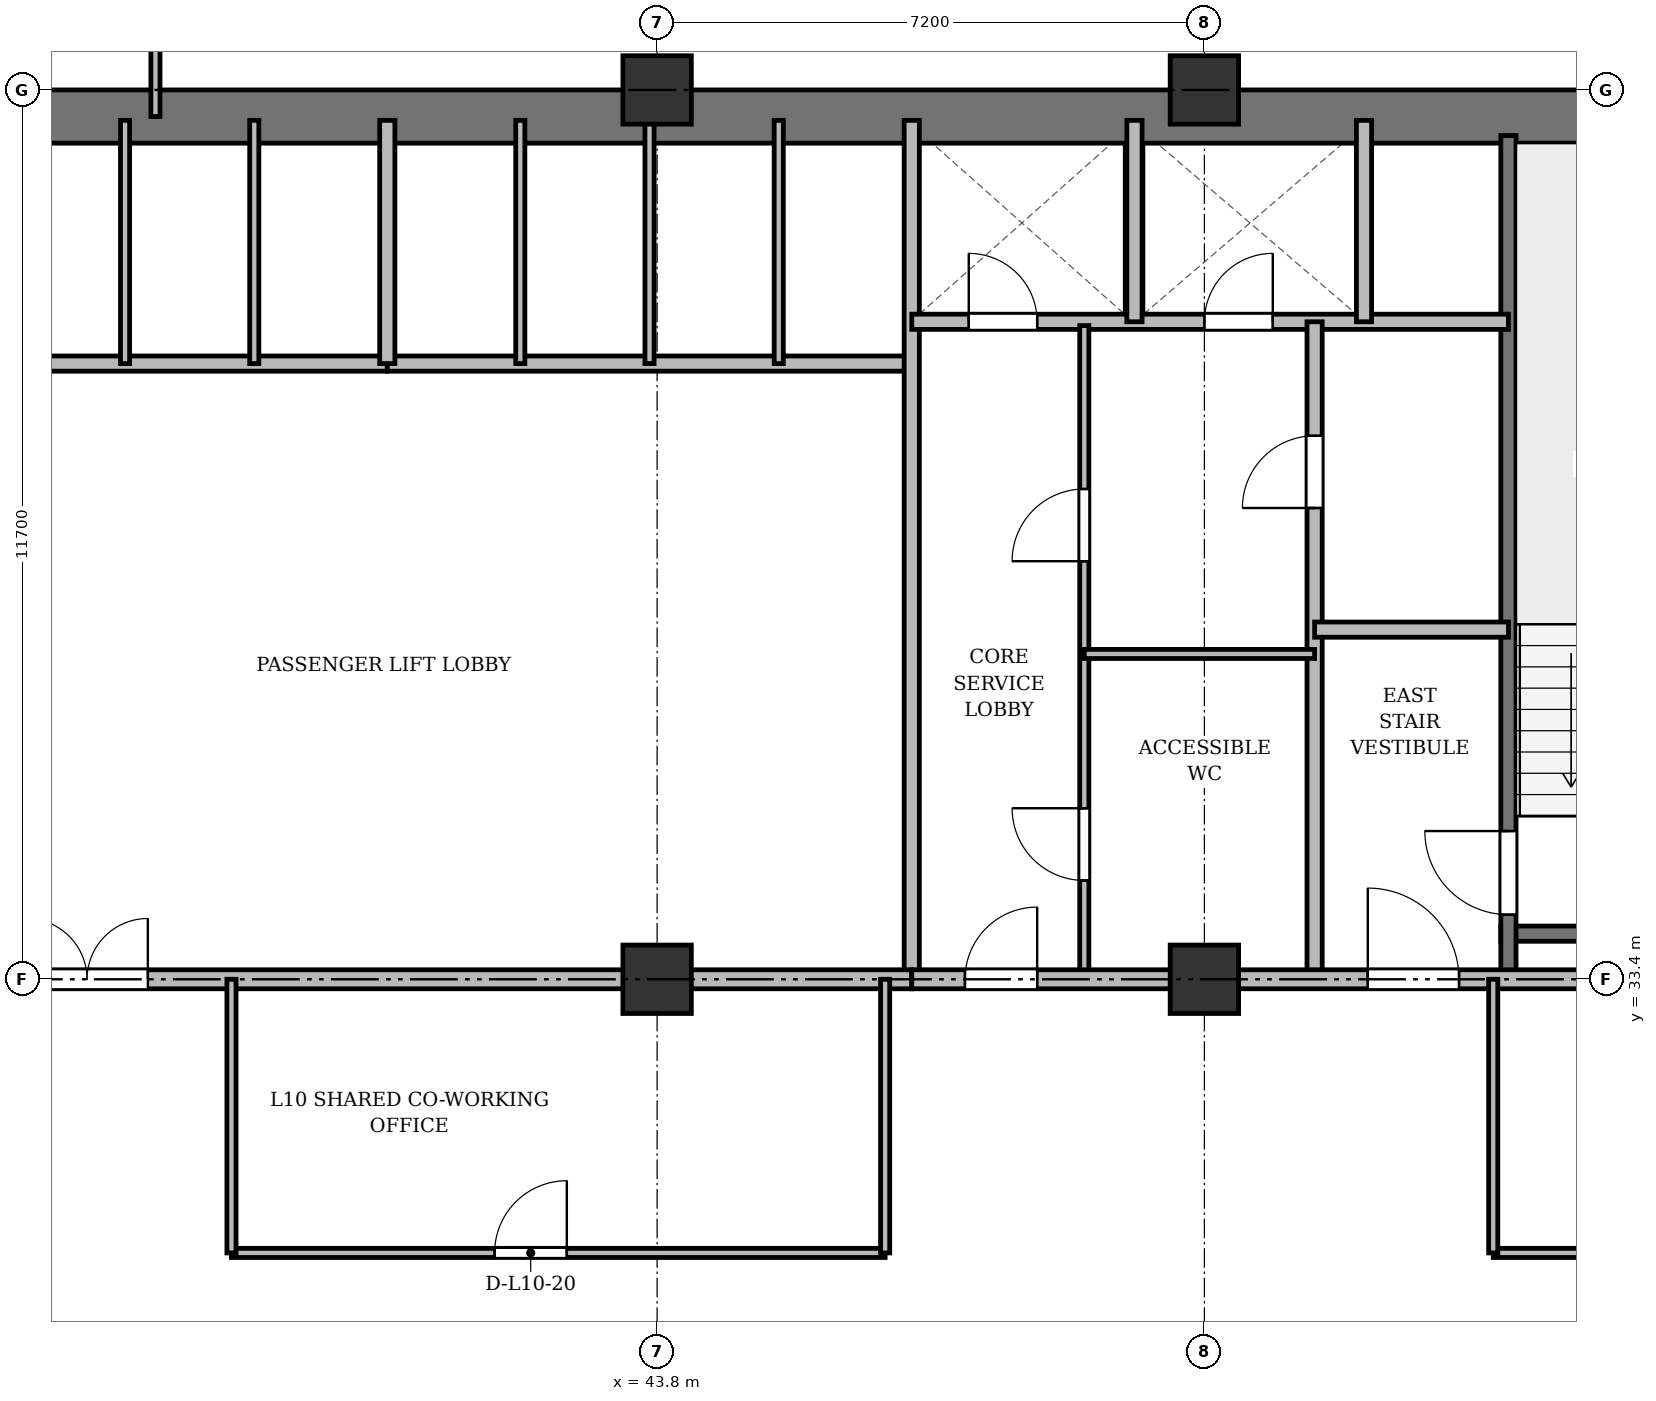
"""IFC4 building model, lengths in metres.
Left out: names, types, materials, properties, quantities, classifications, styles, units other than length and angle.
Written with IfcOpenShell. Run it as: python <this file> out.ifc"""

import sys

from ifc_helpers import new_model, si_unit, direction, frame, frame_2d, origin, origin_2d, place, context, subcontext, project, spatial, rectangle, extrude, source, transform, mapped, element, fill, save


model = new_model("IFC4")
c1 = context("Model", 3, precision=1e-05, world=origin(), true_north=direction((0.0, 1.0)))
c2 = subcontext(c1, "Body", "Model", "MODEL_VIEW")
j1 = project(units=[si_unit("LENGTHUNIT", "METRE"), si_unit("PLANEANGLEUNIT", "RADIAN")], contexts=[c1])
p1 = place(None, origin())
s1 = spatial("IfcSite", under=j1, at=p1, CompositionType="ELEMENT")
p2 = place(p1, origin())
s2 = spatial("IfcBuilding", under=s1, at=p2, CompositionType="ELEMENT")
p3 = place(p2, frame((0.0, 0.0, 41.5)))
s3 = spatial("IfcBuildingStorey", under=s2, at=p3, CompositionType="ELEMENT", Elevation=41.5)
m1 = source(origin(), c2, "Body", "SweptSolid", [
    extrude(rectangle(XDim=0.9, YDim=0.9, at=origin_2d()), origin(), (0.0, 0.0, 1.0), 3.6),
])
for number, where, z_axis, x_axis in (
    (1, (43.8, 33.4, 0.0), (0.0, 0.0, 1.0), (1.0, 0.0, 0.0)),
    (2, (43.8, 45.1, 0.0), (0.0, 0.0, 1.0), (1.0, 0.0, 0.0)),
    (3, (51.0, 33.4, 0.0), (0.0, 0.0, 1.0), (1.0, 0.0, 0.0)),
    (4, (51.0, 45.1, 0.0), (0.0, 0.0, 1.0), (1.0, 0.0, 0.0)),
):
    element("IfcColumn", number, at=place(p3, frame(where, z_axis=z_axis, x_axis=x_axis)), inside=s3, PredefinedType="COLUMN", context=c2, shape_type="MappedRepresentation", body=[
        mapped(m1, transform((0.0, 0.0, 0.0), x_axis=(1.0, 0.0, 0.0), y_axis=(0.0, 1.0, 0.0), z_axis=(0.0, 0.0, 1.0), scale=1.0)),
    ])
p4 = place(p3, frame((15.5, 44.75, 0.0), z_axis=(0.0, 0.0, 1.0), x_axis=(1.0, 0.0, 0.0)))
e5 = element("IfcWall", 5, at=p4, inside=s3, PredefinedType="SHEAR", context=c2, shape_type="SweptSolid", body=[
    extrude(rectangle(XDim=43.4, YDim=0.7, at=frame_2d((21.7, 0.0))), origin(), (0.0, 0.0, 1.0), 3.34),
])
p5 = place(p3, frame((54.9, 34.0, 0.0), z_axis=(0.0, 0.0, 1.0), x_axis=(1.0, 0.0, 0.0)))
e6 = element("IfcWall", 6, at=p5, inside=s3, PredefinedType="SHEAR", context=c2, shape_type="SweptSolid", body=[
    extrude(rectangle(XDim=3.4, YDim=0.2, at=frame_2d((1.7, 0.0))), origin(), (0.0, 0.0, 1.0), 3.34),
])
p6 = place(p3, frame((55.0, 33.4, 0.0), z_axis=(0.0, 0.0, 1.0), x_axis=(0.0, 1.0, 0.0)))
e7 = element("IfcWall", 7, at=p6, inside=s3, PredefinedType="SHEAR", context=c2, shape_type="SweptSolid", body=[
    extrude(rectangle(XDim=11.1, YDim=0.2, at=frame_2d((5.55, 0.0))), origin(), (0.0, 0.0, 1.0), 3.34),
])
p7 = place(p6, frame((0.85, 0.0, 0.0)))
e8 = element("IfcOpeningElement", 8, at=p7, cuts=e7, PredefinedType="OPENING", context=c2, shape_type="SweptSolid", body=[
    extrude(rectangle(XDim=1.1, YDim=2.15, at=frame_2d((0.55, 1.075))), frame((0.0, 0.11, 0.0), z_axis=(0.0, -1.0, 0.0), x_axis=(1.0, 0.0, 0.0)), (0.0, 0.0, 1.0), 0.22),
])
p8 = place(p3, frame((33.35, 41.5, 0.0), z_axis=(0.0, 0.0, 1.0), x_axis=(1.0, 0.0, 0.0)))
e9 = element("IfcWall", 9, at=p8, inside=s3, PredefinedType="SOLIDWALL", context=c2, shape_type="SweptSolid", body=[
    extrude(rectangle(XDim=6.9, YDim=0.2, at=frame_2d((3.45, 0.0))), origin(), (0.0, 0.0, 1.0), 3.34),
])
for number, where, z_axis, x_axis in (
    (10, (36.8, 41.5, 0.0), (0.0, 0.0, 1.0), (0.0, 1.0, 0.0)),
    (11, (38.5, 41.5, 0.0), (0.0, 0.0, 1.0), (0.0, 1.0, 0.0)),
):
    element("IfcWall", number, at=place(p3, frame(where, z_axis=z_axis, x_axis=x_axis)), inside=s3, PredefinedType="PARTITIONING", context=c2, shape_type="SweptSolid", body=[
        extrude(rectangle(XDim=3.2, YDim=0.12, at=frame_2d((1.6, 0.0))), origin(), (0.0, 0.0, 1.0), 3.34),
    ])
p9 = place(p3, frame((40.25, 41.5, 0.0), z_axis=(0.0, 0.0, 1.0), x_axis=(1.0, 0.0, 0.0)))
e12 = element("IfcWall", 12, at=p9, inside=s3, PredefinedType="SOLIDWALL", context=c2, shape_type="SweptSolid", body=[
    extrude(rectangle(XDim=6.9, YDim=0.2, at=frame_2d((3.45, 0.0))), origin(), (0.0, 0.0, 1.0), 2.752),
])
p10 = place(p3, frame((40.25, 41.5, 0.0), z_axis=(0.0, 0.0, 1.0), x_axis=(0.0, 1.0, 0.0)))
e13 = element("IfcWall", 13, at=p10, inside=s3, PredefinedType="SOLIDWALL", context=c2, shape_type="SweptSolid", body=[
    extrude(rectangle(XDim=3.2, YDim=0.2, at=frame_2d((1.6, 0.0))), origin(), (0.0, 0.0, 1.0), 3.34),
])
p11 = place(p3, frame((42.0, 41.5, 0.0), z_axis=(0.0, 0.0, 1.0), x_axis=(0.0, 1.0, 0.0)))
e14 = element("IfcWall", 14, at=p11, inside=s3, PredefinedType="PARTITIONING", context=c2, shape_type="SweptSolid", body=[
    extrude(rectangle(XDim=3.2, YDim=0.12, at=frame_2d((1.6, 0.0))), origin(), (0.0, 0.0, 1.0), 3.34),
])
p12 = place(p3, frame((43.7, 41.5, 0.0), z_axis=(0.0, 0.0, 1.0), x_axis=(0.0, 1.0, 0.0)))
e15 = element("IfcWall", 15, at=p12, inside=s3, PredefinedType="PARTITIONING", context=c2, shape_type="SweptSolid", body=[
    extrude(rectangle(XDim=3.2, YDim=0.12, at=frame_2d((1.6, 0.0))), origin(), (0.0, 0.0, 1.0), 2.752),
])
p13 = place(p3, frame((45.4, 41.5, 0.0), z_axis=(0.0, 0.0, 1.0), x_axis=(0.0, 1.0, 0.0)))
e16 = element("IfcWall", 16, at=p13, inside=s3, PredefinedType="PARTITIONING", context=c2, shape_type="SweptSolid", body=[
    extrude(rectangle(XDim=3.2, YDim=0.12, at=frame_2d((1.6, 0.0))), origin(), (0.0, 0.0, 1.0), 3.34),
])
p14 = place(p3, frame((47.15, 33.4, 0.0), z_axis=(0.0, 0.0, 1.0), x_axis=(0.0, 1.0, 0.0)))
e17 = element("IfcWall", 17, at=p14, inside=s3, PredefinedType="SOLIDWALL", context=c2, shape_type="SweptSolid", body=[
    extrude(rectangle(XDim=11.3, YDim=0.2, at=frame_2d((5.65, 0.0))), origin(), (0.0, 0.0, 1.0), 2.69),
])
p15 = place(p3, frame((26.3, 33.4, 0.0), z_axis=(0.0, 0.0, 1.0), x_axis=(1.0, 0.0, 0.0)))
e18 = element("IfcWall", 18, at=p15, inside=s3, PredefinedType="PARTITIONING", context=c2, shape_type="SweptSolid", body=[
    extrude(rectangle(XDim=20.85, YDim=0.25, at=frame_2d((10.425, 0.0))), origin(), (0.0, 0.0, 1.0), 2.69),
])
p16 = place(p15, frame((9.2, 0.0, 0.0)))
e19 = element("IfcOpeningElement", 19, at=p16, cuts=e18, PredefinedType="OPENING", context=c2, shape_type="SweptSolid", body=[
    extrude(rectangle(XDim=1.6, YDim=2.2, at=frame_2d((0.8, 1.1))), frame((0.0, 0.135, 0.0), z_axis=(0.0, -1.0, 0.0), x_axis=(1.0, 0.0, 0.0)), (0.0, 0.0, 1.0), 0.27),
])
p17 = place(p3, frame((47.15, 42.05, 0.0), z_axis=(0.0, 0.0, 1.0), x_axis=(1.0, 0.0, 0.0)))
e20 = element("IfcWall", 20, at=p17, inside=s3, PredefinedType="SOLIDWALL", context=c2, shape_type="SweptSolid", body=[
    extrude(rectangle(XDim=7.85, YDim=0.2, at=frame_2d((3.925, 0.0))), origin(), (0.0, 0.0, 1.0), 2.752),
])
p18 = place(p17, frame((0.75, 0.0, 0.0)))
e21 = element("IfcOpeningElement", 21, at=p18, cuts=e20, PredefinedType="OPENING", context=c2, shape_type="SweptSolid", body=[
    extrude(rectangle(XDim=0.9, YDim=2.1, at=frame_2d((0.45, 1.05))), frame((0.0, 0.11, 0.0), z_axis=(0.0, -1.0, 0.0), x_axis=(1.0, 0.0, 0.0)), (0.0, 0.0, 1.0), 0.22),
])
p19 = place(p17, frame((3.85, 0.0, 0.0)))
e22 = element("IfcOpeningElement", 22, at=p19, cuts=e20, PredefinedType="OPENING", context=c2, shape_type="SweptSolid", body=[
    extrude(rectangle(XDim=0.9, YDim=2.1, at=frame_2d((0.45, 1.05))), frame((0.0, 0.11, 0.0), z_axis=(0.0, -1.0, 0.0), x_axis=(1.0, 0.0, 0.0)), (0.0, 0.0, 1.0), 0.22),
])
for number, where, z_axis, x_axis in (
    (23, (50.08, 42.05, 0.0), (0.0, 0.0, 1.0), (0.0, 1.0, 0.0)),
    (24, (53.1, 42.05, 0.0), (0.0, 0.0, 1.0), (0.0, 1.0, 0.0)),
):
    element("IfcWall", number, at=place(p3, frame(where, z_axis=z_axis, x_axis=x_axis)), inside=s3, PredefinedType="SOLIDWALL", context=c2, shape_type="SweptSolid", body=[
        extrude(rectangle(XDim=2.65, YDim=0.2, at=frame_2d((1.325, 0.0))), origin(), (0.0, 0.0, 1.0), 3.34),
    ])
p20 = place(p3, frame((52.45, 33.4, 0.0), z_axis=(0.0, 0.0, 1.0), x_axis=(0.0, 1.0, 0.0)))
e25 = element("IfcWall", 25, at=p20, inside=s3, PredefinedType="PARTITIONING", context=c2, shape_type="SweptSolid", body=[
    extrude(rectangle(XDim=8.65, YDim=0.2, at=frame_2d((4.325, 0.0))), origin(), (0.0, 0.0, 1.0), 2.69),
])
p21 = place(p20, frame((6.2, 0.0, 0.0)))
e26 = element("IfcOpeningElement", 26, at=p21, cuts=e25, PredefinedType="OPENING", context=c2, shape_type="SweptSolid", body=[
    extrude(rectangle(XDim=0.95, YDim=2.15, at=frame_2d((0.475, 1.075))), frame((0.0, 0.11, 0.0), z_axis=(0.0, -1.0, 0.0), x_axis=(1.0, 0.0, 0.0)), (0.0, 0.0, 1.0), 0.22),
])
p22 = place(p3, frame((52.45, 38.0, 0.0), z_axis=(0.0, 0.0, 1.0), x_axis=(1.0, 0.0, 0.0)))
e27 = element("IfcWall", 27, at=p22, inside=s3, PredefinedType="PARTITIONING", context=c2, shape_type="SweptSolid", body=[
    extrude(rectangle(XDim=2.55, YDim=0.2, at=frame_2d((1.275, 0.0))), origin(), (0.0, 0.0, 1.0), 3.34),
])
p23 = place(p3, frame((49.42, 33.4, 0.0), z_axis=(0.0, 0.0, 1.0), x_axis=(0.0, 1.0, 0.0)))
e28 = element("IfcWall", 28, at=p23, inside=s3, PredefinedType="PARTITIONING", context=c2, shape_type="SweptSolid", body=[
    extrude(rectangle(XDim=8.6, YDim=0.12, at=frame_2d((4.3, 0.0))), origin(), (0.0, 0.0, 1.0), 2.69),
])
p24 = place(p23, frame((1.3, 0.0, 0.0)))
e29 = element("IfcOpeningElement", 29, at=p24, cuts=e28, PredefinedType="OPENING", context=c2, shape_type="SweptSolid", body=[
    extrude(rectangle(XDim=0.95, YDim=2.15, at=frame_2d((0.475, 1.075))), frame((0.0, 0.07, 0.0), z_axis=(0.0, -1.0, 0.0), x_axis=(1.0, 0.0, 0.0)), (0.0, 0.0, 1.0), 0.14),
])
p25 = place(p23, frame((5.5, 0.0, 0.0)))
e30 = element("IfcOpeningElement", 30, at=p25, cuts=e28, PredefinedType="OPENING", context=c2, shape_type="SweptSolid", body=[
    extrude(rectangle(XDim=0.95, YDim=2.15, at=frame_2d((0.475, 1.075))), frame((0.0, 0.07, 0.0), z_axis=(0.0, -1.0, 0.0), x_axis=(1.0, 0.0, 0.0)), (0.0, 0.0, 1.0), 0.14),
])
p26 = place(p3, frame((49.42, 37.68, 0.0), z_axis=(0.0, 0.0, 1.0), x_axis=(1.0, 0.0, 0.0)))
e31 = element("IfcWall", 31, at=p26, inside=s3, PredefinedType="PARTITIONING", context=c2, shape_type="SweptSolid", body=[
    extrude(rectangle(XDim=3.03, YDim=0.12, at=frame_2d((1.515, 0.0))), origin(), (0.0, 0.0, 1.0), 2.752),
])
p27 = place(p3, frame((47.15, 33.4, 0.0), z_axis=(0.0, 0.0, 1.0), x_axis=(1.0, 0.0, 0.0)))
e32 = element("IfcWall", 32, at=p27, inside=s3, PredefinedType="PARTITIONING", context=c2, shape_type="SweptSolid", body=[
    extrude(rectangle(XDim=11.15, YDim=0.25, at=frame_2d((5.575, 0.0))), origin(), (0.0, 0.0, 1.0), 2.69),
])
p28 = place(p27, frame((0.7, 0.0, 0.0)))
e33 = element("IfcOpeningElement", 33, at=p28, cuts=e32, PredefinedType="OPENING", context=c2, shape_type="SweptSolid", body=[
    extrude(rectangle(XDim=0.95, YDim=2.15, at=frame_2d((0.475, 1.075))), frame((0.0, 0.135, 0.0), z_axis=(0.0, -1.0, 0.0), x_axis=(1.0, 0.0, 0.0)), (0.0, 0.0, 1.0), 0.27),
])
p29 = place(p27, frame((6.0, 0.0, 0.0)))
e34 = element("IfcOpeningElement", 34, at=p29, cuts=e32, PredefinedType="OPENING", context=c2, shape_type="SweptSolid", body=[
    extrude(rectangle(XDim=1.2, YDim=2.15, at=frame_2d((0.6, 1.075))), frame((0.0, 0.135, 0.0), z_axis=(0.0, -1.0, 0.0), x_axis=(1.0, 0.0, 0.0)), (0.0, 0.0, 1.0), 0.27),
])
p30 = place(p3, frame((38.2, 29.8, 0.0), z_axis=(0.0, 0.0, 1.0), x_axis=(1.0, 0.0, 0.0)))
e35 = element("IfcWall", 35, at=p30, inside=s3, PredefinedType="PARTITIONING", context=c2, shape_type="SweptSolid", body=[
    extrude(rectangle(XDim=8.6, YDim=0.12, at=frame_2d((4.3, 0.0))), origin(), (0.0, 0.0, 1.0), 2.752),
])
p31 = place(p30, frame((3.462, 0.0, 0.0)))
e36 = element("IfcOpeningElement", 36, at=p31, cuts=e35, PredefinedType="OPENING", context=c2, shape_type="SweptSolid", body=[
    extrude(rectangle(XDim=0.95, YDim=2.15, at=frame_2d((0.475, 1.075))), frame((0.0, 0.07, 0.0), z_axis=(0.0, -1.0, 0.0), x_axis=(1.0, 0.0, 0.0)), (0.0, 0.0, 1.0), 0.14),
])
p32 = place(p3, frame((54.8, 29.8, 0.0), z_axis=(0.0, 0.0, 1.0), x_axis=(1.0, 0.0, 0.0)))
e37 = element("IfcWall", 37, at=p32, inside=s3, PredefinedType="PARTITIONING", context=c2, shape_type="SweptSolid", body=[
    extrude(rectangle(XDim=14.85, YDim=0.12, at=frame_2d((7.425, 0.0))), origin(), (0.0, 0.0, 1.0), 2.752),
])
p33 = place(p32, frame((2.5, 0.0, 0.0)))
e38 = element("IfcOpeningElement", 38, at=p33, cuts=e37, PredefinedType="OPENING", context=c2, shape_type="SweptSolid", body=[
    extrude(rectangle(XDim=0.95, YDim=2.15, at=frame_2d((0.475, 1.075))), frame((0.0, 0.07, 0.0), z_axis=(0.0, -1.0, 0.0), x_axis=(1.0, 0.0, 0.0)), (0.0, 0.0, 1.0), 0.14),
])
p34 = place(p32, frame((9.2, 0.0, 0.0)))
e39 = element("IfcOpeningElement", 39, at=p34, cuts=e37, PredefinedType="OPENING", context=c2, shape_type="SweptSolid", body=[
    extrude(rectangle(XDim=0.95, YDim=2.15, at=frame_2d((0.475, 1.075))), frame((0.0, 0.07, 0.0), z_axis=(0.0, -1.0, 0.0), x_axis=(1.0, 0.0, 0.0)), (0.0, 0.0, 1.0), 0.14),
])
for number, where, z_axis, x_axis in (
    (40, (38.2, 29.8, 0.0), (0.0, 0.0, 1.0), (0.0, 1.0, 0.0)),
    (41, (46.8, 29.8, 0.0), (0.0, 0.0, 1.0), (0.0, 1.0, 0.0)),
    (42, (54.8, 29.8, 0.0), (0.0, 0.0, 1.0), (0.0, 1.0, 0.0)),
):
    element("IfcWall", number, at=place(p3, frame(where, z_axis=z_axis, x_axis=x_axis)), inside=s3, PredefinedType="PARTITIONING", context=c2, shape_type="SweptSolid", body=[
        extrude(rectangle(XDim=3.6, YDim=0.12, at=frame_2d((1.8, 0.0))), origin(), (0.0, 0.0, 1.0), 2.69),
    ])
p35 = place(p3, frame((37.2, 44.75, 0.0), z_axis=(0.0, 0.0, 1.0), x_axis=(0.0, 1.0, 0.0)))
e43 = element("IfcWall", 43, at=p35, inside=s3, PredefinedType="PARTITIONING", context=c2, shape_type="SweptSolid", body=[
    extrude(rectangle(XDim=3.61, YDim=0.12, at=frame_2d((1.805, 0.0))), origin(), (0.0, 0.0, 1.0), 2.69),
])
p36 = place(p35, frame((1.1, 0.0, 0.0)))
e44 = element("IfcOpeningElement", 44, at=p36, cuts=e43, PredefinedType="OPENING", context=c2, shape_type="SweptSolid", body=[
    extrude(rectangle(XDim=0.95, YDim=2.15, at=frame_2d((0.475, 1.075))), frame((0.0, 0.07, 0.0), z_axis=(0.0, -1.0, 0.0), x_axis=(1.0, 0.0, 0.0)), (0.0, 0.0, 1.0), 0.14),
])
m2 = source(origin(), c2, "Body", "SweptSolid", [
    extrude(rectangle(XDim=1.1, YDim=2.15, at=frame_2d((0.55, 1.075))), frame((0.0, 0.025, 0.0), z_axis=(0.0, -1.0, 0.0), x_axis=(1.0, 0.0, 0.0)), (0.0, 0.0, 1.0), 0.05),
])
p37 = place(p7, origin())
e45 = element("IfcDoor", 45, at=p37, inside=s3, OperationType="SINGLE_SWING_RIGHT", PredefinedType="DOOR", context=c2, shape_type="MappedRepresentation", body=[
    mapped(m2, transform((0.0, 0.0, 0.0), x_axis=(1.0, 0.0, 0.0), y_axis=(0.0, 1.0, 0.0), z_axis=(0.0, 0.0, 1.0), scale=1.0)),
])
fill(e8, e45)
m3 = source(origin(), c2, "Body", "SweptSolid", [
    extrude(rectangle(XDim=1.6, YDim=2.2, at=frame_2d((0.8, 1.1))), frame((0.0, 0.025, 0.0), z_axis=(0.0, -1.0, 0.0), x_axis=(1.0, 0.0, 0.0)), (0.0, 0.0, 1.0), 0.05),
])
p38 = place(p16, origin())
e46 = element("IfcDoor", 46, at=p38, inside=s3, OperationType="DOUBLE_DOOR_SINGLE_SWING", PredefinedType="DOOR", context=c2, shape_type="MappedRepresentation", body=[
    mapped(m3, transform((0.0, 0.0, 0.0), x_axis=(1.0, 0.0, 0.0), y_axis=(0.0, 1.0, 0.0), z_axis=(0.0, 0.0, 1.0), scale=1.0)),
])
fill(e19, e46)
m4 = source(origin(), c2, "Body", "SweptSolid", [
    extrude(rectangle(XDim=0.9, YDim=2.1, at=frame_2d((0.45, 1.05))), frame((0.0, 0.025, 0.0), z_axis=(0.0, -1.0, 0.0), x_axis=(1.0, 0.0, 0.0)), (0.0, 0.0, 1.0), 0.05),
])
p39 = place(p18, origin())
e47 = element("IfcDoor", 47, at=p39, inside=s3, OperationType="SINGLE_SWING_LEFT", PredefinedType="DOOR", context=c2, shape_type="MappedRepresentation", body=[
    mapped(m4, transform((0.0, 0.0, 0.0), x_axis=(1.0, 0.0, 0.0), y_axis=(0.0, 1.0, 0.0), z_axis=(0.0, 0.0, 1.0), scale=1.0)),
])
fill(e21, e47)
p40 = place(p19, origin())
e48 = element("IfcDoor", 48, at=p40, inside=s3, OperationType="SINGLE_SWING_RIGHT", PredefinedType="DOOR", context=c2, shape_type="MappedRepresentation", body=[
    mapped(m4, transform((0.0, 0.0, 0.0), x_axis=(1.0, 0.0, 0.0), y_axis=(0.0, 1.0, 0.0), z_axis=(0.0, 0.0, 1.0), scale=1.0)),
])
fill(e22, e48)
m5 = source(origin(), c2, "Body", "SweptSolid", [
    extrude(rectangle(XDim=0.95, YDim=2.15, at=frame_2d((0.475, 1.075))), frame((0.0, 0.025, 0.0), z_axis=(0.0, -1.0, 0.0), x_axis=(1.0, 0.0, 0.0)), (0.0, 0.0, 1.0), 0.05),
])
p41 = place(p21, origin())
e49 = element("IfcDoor", 49, at=p41, inside=s3, OperationType="SINGLE_SWING_LEFT", PredefinedType="DOOR", context=c2, shape_type="MappedRepresentation", body=[
    mapped(m5, transform((0.0, 0.0, 0.0), x_axis=(1.0, 0.0, 0.0), y_axis=(0.0, 1.0, 0.0), z_axis=(0.0, 0.0, 1.0), scale=1.0)),
])
fill(e26, e49)
p42 = place(p24, origin())
e50 = element("IfcDoor", 50, at=p42, inside=s3, OperationType="SINGLE_SWING_RIGHT", PredefinedType="DOOR", context=c2, shape_type="MappedRepresentation", body=[
    mapped(m5, transform((0.0, 0.0, 0.0), x_axis=(1.0, 0.0, 0.0), y_axis=(0.0, 1.0, 0.0), z_axis=(0.0, 0.0, 1.0), scale=1.0)),
])
fill(e29, e50)
p43 = place(p25, origin())
e51 = element("IfcDoor", 51, at=p43, inside=s3, OperationType="SINGLE_SWING_LEFT", PredefinedType="DOOR", context=c2, shape_type="MappedRepresentation", body=[
    mapped(m5, transform((0.0, 0.0, 0.0), x_axis=(1.0, 0.0, 0.0), y_axis=(0.0, 1.0, 0.0), z_axis=(0.0, 0.0, 1.0), scale=1.0)),
])
fill(e30, e51)
p44 = place(p28, origin())
e52 = element("IfcDoor", 52, at=p44, inside=s3, OperationType="SINGLE_SWING_RIGHT", PredefinedType="DOOR", context=c2, shape_type="MappedRepresentation", body=[
    mapped(m5, transform((0.0, 0.0, 0.0), x_axis=(1.0, 0.0, 0.0), y_axis=(0.0, 1.0, 0.0), z_axis=(0.0, 0.0, 1.0), scale=1.0)),
])
fill(e33, e52)
m6 = source(origin(), c2, "Body", "SweptSolid", [
    extrude(rectangle(XDim=1.2, YDim=2.15, at=frame_2d((0.6, 1.075))), frame((0.0, 0.025, 0.0), z_axis=(0.0, -1.0, 0.0), x_axis=(1.0, 0.0, 0.0)), (0.0, 0.0, 1.0), 0.05),
])
p45 = place(p29, origin())
e53 = element("IfcDoor", 53, at=p45, inside=s3, OperationType="SINGLE_SWING_LEFT", PredefinedType="DOOR", context=c2, shape_type="MappedRepresentation", body=[
    mapped(m6, transform((0.0, 0.0, 0.0), x_axis=(1.0, 0.0, 0.0), y_axis=(0.0, 1.0, 0.0), z_axis=(0.0, 0.0, 1.0), scale=1.0)),
])
fill(e34, e53)
p46 = place(p31, origin())
e54 = element("IfcDoor", 54, at=p46, inside=s3, OperationType="SINGLE_SWING_RIGHT", PredefinedType="DOOR", context=c2, shape_type="MappedRepresentation", body=[
    mapped(m5, transform((0.0, 0.0, 0.0), x_axis=(1.0, 0.0, 0.0), y_axis=(0.0, 1.0, 0.0), z_axis=(0.0, 0.0, 1.0), scale=1.0)),
])
fill(e36, e54)
save(model, sys.argv[1])
